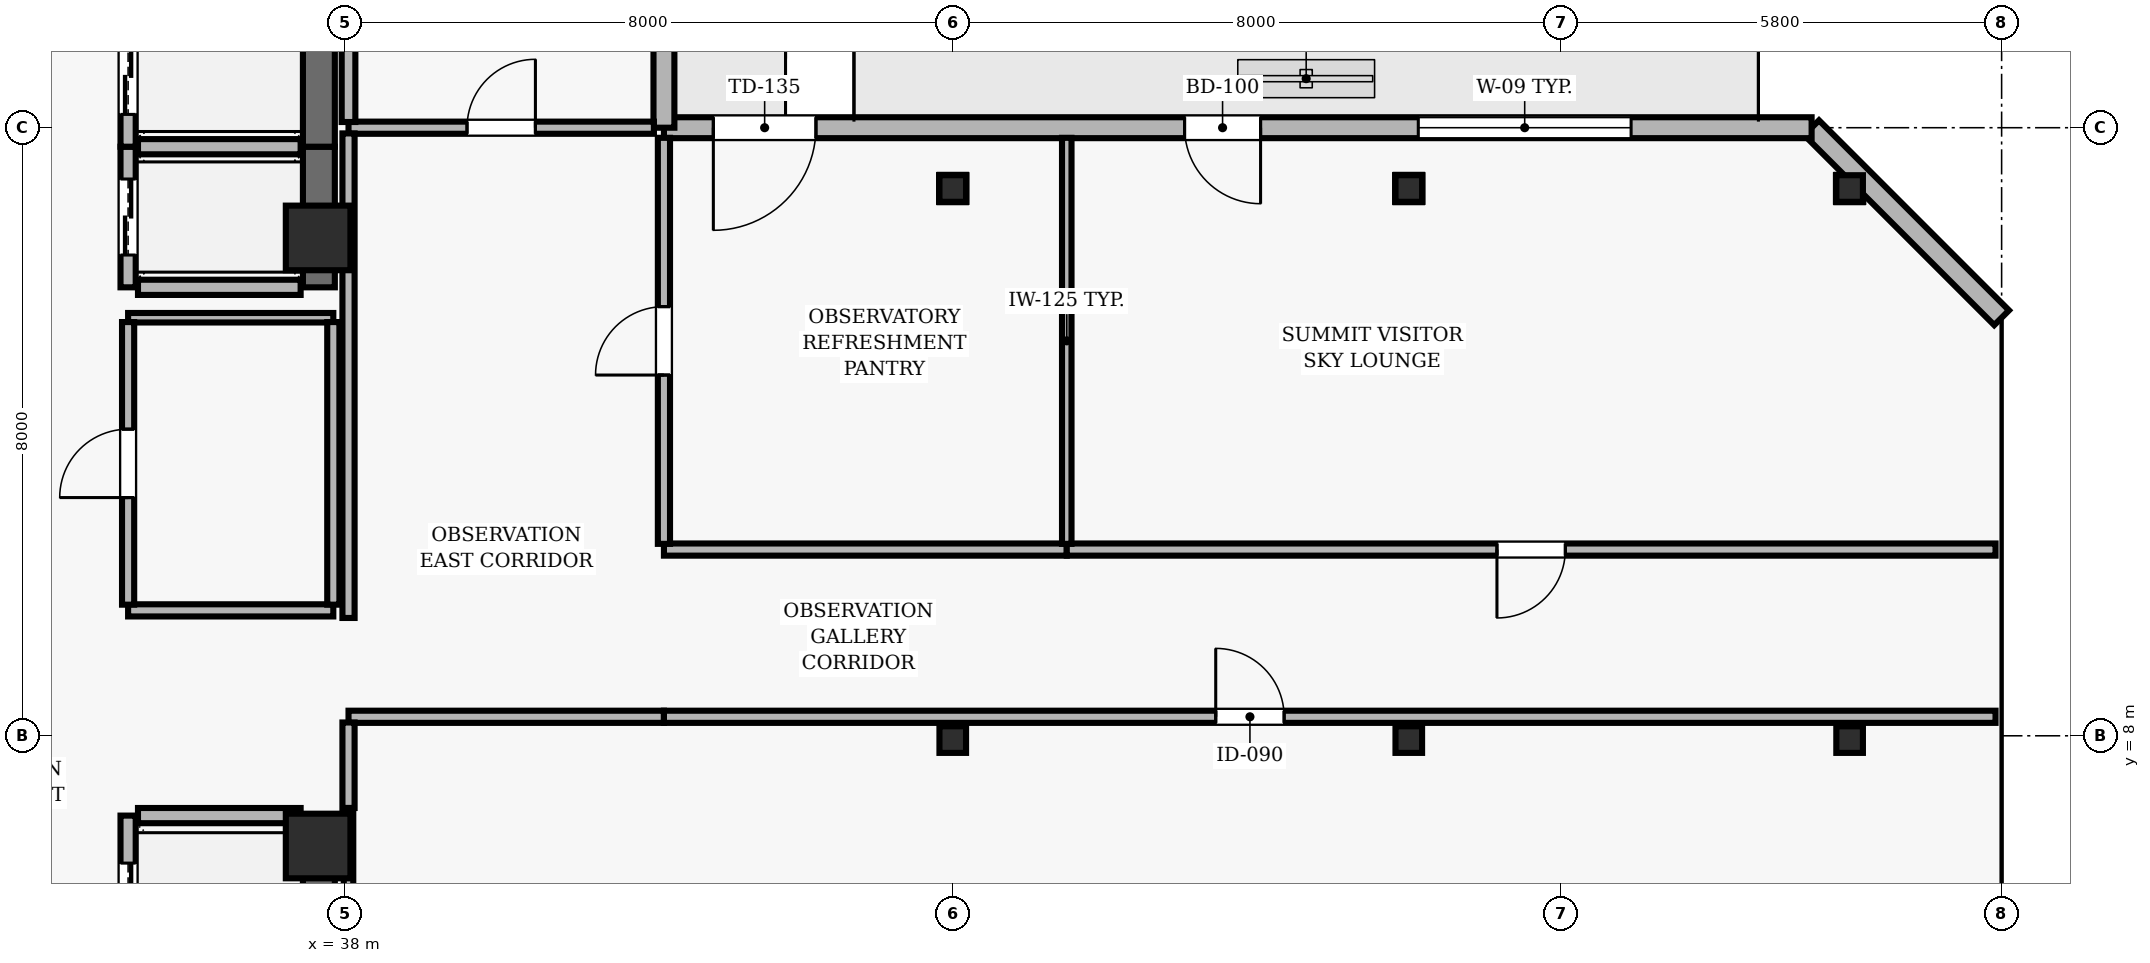
"""IFC4 building model, lengths in metres.
Left out: names, types, materials, properties, quantities, classifications, styles, units other than length and angle.
Written with IfcOpenShell. Run it as: python <this file> out.ifc"""

import sys

from ifc_helpers import new_model, si_unit, direction, frame, frame_2d, origin, origin_2d, place, context, subcontext, project, spatial, rectangle, hollow_rectangle, extrude, element, fill, save


model = new_model("IFC4")
c1 = context("Model", 3, precision=1e-05, world=origin(), true_north=direction((0.0, 1.0)))
c2 = subcontext(c1, "Body", "Model", "MODEL_VIEW")
j1 = project(units=[si_unit("LENGTHUNIT", "METRE"), si_unit("PLANEANGLEUNIT", "RADIAN")], contexts=[c1])
p1 = place(None, origin())
s1 = spatial("IfcSite", under=j1, at=p1, CompositionType="ELEMENT")
p2 = place(p1, origin())
s2 = spatial("IfcBuilding", under=s1, at=p2, CompositionType="ELEMENT")
p3 = place(p2, frame((0.0, 0.0, 311.7)))
s3 = spatial("IfcBuildingStorey", under=s2, at=p3, CompositionType="ELEMENT", Elevation=311.7)
for number, where, z_axis, x_axis in (
    (1, (37.65, 6.55, 0.0), (0.0, 0.0, 1.0), (1.0, 0.0, 0.0)),
    (2, (37.65, 14.55, 0.0), (0.0, 0.0, 1.0), (1.0, 0.0, 0.0)),
):
    element("IfcColumn", number, at=place(p3, frame(where, z_axis=z_axis, x_axis=x_axis)), inside=s3, PredefinedType="COLUMN", context=c2, shape_type="SweptSolid", body=[
        extrude(rectangle(XDim=0.85, YDim=0.85, at=origin_2d()), origin(), (0.0, 0.0, 1.0), 5.0),
    ])
for number, where, z_axis, x_axis in (
    (3, (46.0, 7.95, 0.0), (0.0, 0.0, 1.0), (1.0, 0.0, 0.0)),
    (4, (46.0, 15.2, 0.0), (0.0, 0.0, 1.0), (1.0, 0.0, 0.0)),
    (5, (52.0, 7.95, 0.0), (0.0, 0.0, 1.0), (1.0, 0.0, 0.0)),
    (6, (52.0, 15.2, 0.0), (0.0, 0.0, 1.0), (1.0, 0.0, 0.0)),
    (7, (57.8, 7.95, 0.0), (0.0, 0.0, 1.0), (1.0, 0.0, 0.0)),
    (8, (57.8, 15.2, 0.0), (0.0, 0.0, 1.0), (1.0, 0.0, 0.0)),
):
    element("IfcColumn", number, at=place(p3, frame(where, z_axis=z_axis, x_axis=x_axis)), inside=s3, PredefinedType="COLUMN", context=c2, shape_type="SweptSolid", body=[
        extrude(hollow_rectangle(XDim=0.35, YDim=0.35, WallThickness=0.016, at=origin_2d()), origin(), (0.0, 0.0, 1.0), 5.0),
    ])
p4 = place(p3, frame((59.8, 13.5, 0.0), z_axis=(0.0, 0.0, 1.0), x_axis=(-0.707106781187, 0.707106781187, 0.0)))
e9 = element("IfcWall", 9, at=p4, inside=s3, PredefinedType="SOLIDWALL", context=c2, shape_type="SweptSolid", body=[
    extrude(rectangle(XDim=3.536, YDim=0.275, at=frame_2d((1.768, 0.0))), origin(), (0.0, 0.0, 1.0), 4.74),
])
p5 = place(p3, frame((57.3, 16.0, 0.0), z_axis=(0.0, 0.0, 1.0), x_axis=(-1.0, 0.0, 0.0)))
e10 = element("IfcWall", 10, at=p5, inside=s3, PredefinedType="SOLIDWALL", context=c2, shape_type="SweptSolid", body=[
    extrude(rectangle(XDim=15.1, YDim=0.275, at=frame_2d((7.55, 0.0))), origin(), (0.0, 0.0, 1.0), 4.74),
])
p6 = place(p5, frame((7.25, 0.0, 0.0)))
e11 = element("IfcOpeningElement", 11, at=p6, cuts=e10, PredefinedType="OPENING", context=c2, shape_type="SweptSolid", body=[
    extrude(rectangle(XDim=1.0, YDim=2.2, at=frame_2d((0.5, 1.1))), frame((0.0, 0.147, 0.0), z_axis=(0.0, -1.0, 0.0), x_axis=(1.0, 0.0, 0.0)), (0.0, 0.0, 1.0), 0.295),
])
p7 = place(p5, frame((13.1, 0.0, 0.0)))
e12 = element("IfcOpeningElement", 12, at=p7, cuts=e10, PredefinedType="OPENING", context=c2, shape_type="SweptSolid", body=[
    extrude(rectangle(XDim=1.35, YDim=2.2, at=frame_2d((0.675, 1.1))), frame((0.0, 0.147, 0.0), z_axis=(0.0, -1.0, 0.0), x_axis=(1.0, 0.0, 0.0)), (0.0, 0.0, 1.0), 0.295),
])
p8 = place(p5, frame((2.375, 0.0, 0.9)))
e13 = element("IfcOpeningElement", 13, at=p8, cuts=e10, PredefinedType="OPENING", context=c2, shape_type="SweptSolid", body=[
    extrude(rectangle(XDim=2.8, YDim=1.8, at=frame_2d((1.4, 0.9))), frame((0.0, 0.147, 0.0), z_axis=(0.0, -1.0, 0.0), x_axis=(1.0, 0.0, 0.0)), (0.0, 0.0, 1.0), 0.295),
])
p9 = place(p3, frame((42.2, 16.0, 0.0), z_axis=(0.0, 0.0, 1.0), x_axis=(0.0, 1.0, 0.0)))
e14 = element("IfcWall", 14, at=p9, inside=s3, PredefinedType="SOLIDWALL", context=c2, shape_type="SweptSolid", body=[
    extrude(rectangle(XDim=3.45, YDim=0.275, at=frame_2d((1.725, 0.0))), origin(), (0.0, 0.0, 1.0), 4.74),
])
p10 = place(p3, frame((35.15, 6.95, 0.0), z_axis=(0.0, 0.0, 1.0), x_axis=(0.0, -1.0, 0.0)))
e15 = element("IfcWall", 15, at=p10, inside=s3, PredefinedType="SOLIDWALL", context=c2, shape_type="SweptSolid", body=[
    extrude(rectangle(XDim=2.25, YDim=0.2, at=frame_2d((1.125, 0.0))), origin(), (0.0, 0.0, 1.0), 4.74),
])
p11 = place(p10, frame((0.625, 0.0, 0.0)))
e16 = element("IfcOpeningElement", 16, at=p11, cuts=e15, PredefinedType="OPENING", context=c2, shape_type="SweptSolid", body=[
    extrude(rectangle(XDim=1.0, YDim=2.1, at=frame_2d((0.5, 1.05))), frame((0.0, 0.11, 0.0), z_axis=(0.0, -1.0, 0.0), x_axis=(1.0, 0.0, 0.0)), (0.0, 0.0, 1.0), 0.22),
])
p12 = place(p3, frame((37.66, 4.7, 0.0), z_axis=(0.0, 0.0, 1.0), x_axis=(0.0, 1.0, 0.0)))
e17 = element("IfcWall", 17, at=p12, inside=s3, PredefinedType="SHEAR", context=c2, shape_type="SweptSolid", body=[
    extrude(rectangle(XDim=2.25, YDim=0.42, at=frame_2d((1.125, 0.0))), origin(), (0.0, 0.0, 1.0), 4.74),
])
p13 = place(p3, frame((37.42, 6.95, 0.0), z_axis=(0.0, 0.0, 1.0), x_axis=(-1.0, 0.0, 0.0)))
e18 = element("IfcWall", 18, at=p13, inside=s3, PredefinedType="SOLIDWALL", context=c2, shape_type="SweptSolid", body=[
    extrude(rectangle(XDim=2.14, YDim=0.2, at=frame_2d((1.07, 0.0))), origin(), (0.0, 0.0, 1.0), 4.74),
])
p14 = place(p3, frame((35.15, 15.75, 0.0), z_axis=(0.0, 0.0, 1.0), x_axis=(0.0, -1.0, 0.0)))
e19 = element("IfcWall", 19, at=p14, inside=s3, PredefinedType="SOLIDWALL", context=c2, shape_type="SweptSolid", body=[
    extrude(rectangle(XDim=1.85, YDim=0.2, at=frame_2d((0.925, 0.0))), origin(), (0.0, 0.0, 1.0), 4.74),
])
p15 = place(p14, frame((0.425, 0.0, 0.0)))
e20 = element("IfcOpeningElement", 20, at=p15, cuts=e19, PredefinedType="OPENING", context=c2, shape_type="SweptSolid", body=[
    extrude(rectangle(XDim=1.0, YDim=2.1, at=frame_2d((0.5, 1.05))), frame((0.0, 0.11, 0.0), z_axis=(0.0, -1.0, 0.0), x_axis=(1.0, 0.0, 0.0)), (0.0, 0.0, 1.0), 0.22),
])
p16 = place(p3, frame((37.66, 13.9, 0.0), z_axis=(0.0, 0.0, 1.0), x_axis=(0.0, 1.0, 0.0)))
e21 = element("IfcWall", 21, at=p16, inside=s3, PredefinedType="SHEAR", context=c2, shape_type="SweptSolid", body=[
    extrude(rectangle(XDim=1.85, YDim=0.42, at=frame_2d((0.925, 0.0))), origin(), (0.0, 0.0, 1.0), 4.74),
])
for number, where, z_axis, x_axis in (
    (22, (35.28, 13.9, 0.0), (0.0, 0.0, 1.0), (1.0, 0.0, 0.0)),
    (23, (37.42, 15.75, 0.0), (0.0, 0.0, 1.0), (-1.0, 0.0, 0.0)),
):
    element("IfcWall", number, at=place(p3, frame(where, z_axis=z_axis, x_axis=x_axis)), inside=s3, PredefinedType="SOLIDWALL", context=c2, shape_type="SweptSolid", body=[
        extrude(rectangle(XDim=2.14, YDim=0.2, at=frame_2d((1.07, 0.0))), origin(), (0.0, 0.0, 1.0), 4.74),
    ])
p17 = place(p3, frame((35.15, 17.6, 0.0), z_axis=(0.0, 0.0, 1.0), x_axis=(0.0, -1.0, 0.0)))
e24 = element("IfcWall", 24, at=p17, inside=s3, PredefinedType="SOLIDWALL", context=c2, shape_type="SweptSolid", body=[
    extrude(rectangle(XDim=1.85, YDim=0.2, at=frame_2d((0.925, 0.0))), origin(), (0.0, 0.0, 1.0), 4.74),
])
p18 = place(p17, frame((0.425, 0.0, 0.0)))
e25 = element("IfcOpeningElement", 25, at=p18, cuts=e24, PredefinedType="OPENING", context=c2, shape_type="SweptSolid", body=[
    extrude(rectangle(XDim=1.0, YDim=2.1, at=frame_2d((0.5, 1.05))), frame((0.0, 0.11, 0.0), z_axis=(0.0, -1.0, 0.0), x_axis=(1.0, 0.0, 0.0)), (0.0, 0.0, 1.0), 0.22),
])
p19 = place(p3, frame((37.66, 15.75, 0.0), z_axis=(0.0, 0.0, 1.0), x_axis=(0.0, 1.0, 0.0)))
e26 = element("IfcWall", 26, at=p19, inside=s3, PredefinedType="SHEAR", context=c2, shape_type="SweptSolid", body=[
    extrude(rectangle(XDim=1.85, YDim=0.42, at=frame_2d((0.925, 0.0))), origin(), (0.0, 0.0, 1.0), 4.74),
])
p20 = place(p3, frame((35.15, 9.65, 0.0), z_axis=(0.0, 0.0, 1.0), x_axis=(1.0, 0.0, 0.0)))
e27 = element("IfcWall", 27, at=p20, inside=s3, PredefinedType="PARTITIONING", context=c2, shape_type="SweptSolid", body=[
    extrude(rectangle(XDim=2.7, YDim=0.16, at=frame_2d((1.35, 0.0))), origin(), (0.0, 0.0, 1.0), 4.74),
])
p21 = place(p3, frame((37.85, 13.5, 0.0), z_axis=(0.0, 0.0, 1.0), x_axis=(-1.0, 0.0, 0.0)))
e28 = element("IfcWall", 28, at=p21, inside=s3, PredefinedType="PARTITIONING", context=c2, shape_type="SweptSolid", body=[
    extrude(rectangle(XDim=2.7, YDim=0.125, at=frame_2d((1.35, 0.0))), origin(), (0.0, 0.0, 1.0), 4.74),
])
p22 = place(p3, frame((38.05, 8.25, 0.0), z_axis=(0.0, 0.0, 1.0), x_axis=(1.0, 0.0, 0.0)))
e29 = element("IfcWall", 29, at=p22, inside=s3, PredefinedType="PARTITIONING", context=c2, shape_type="SweptSolid", body=[
    extrude(rectangle(XDim=4.15, YDim=0.16, at=frame_2d((2.075, 0.0))), origin(), (0.0, 0.0, 1.0), 4.271),
])
p23 = place(p3, frame((38.05, 16.0, 0.0), z_axis=(0.0, 0.0, 1.0), x_axis=(1.0, 0.0, 0.0)))
e30 = element("IfcWall", 30, at=p23, inside=s3, PredefinedType="PARTITIONING", context=c2, shape_type="SweptSolid", body=[
    extrude(rectangle(XDim=4.018, YDim=0.16, at=frame_2d((2.009, 0.0))), origin(), (0.0, 0.0, 1.0), 4.74),
])
p24 = place(p23, frame((1.559, 0.0, 0.0)))
e31 = element("IfcOpeningElement", 31, at=p24, cuts=e30, PredefinedType="OPENING", context=c2, shape_type="SweptSolid", body=[
    extrude(rectangle(XDim=0.9, YDim=2.1, at=frame_2d((0.45, 1.05))), frame((0.0, 0.09, 0.0), z_axis=(0.0, -1.0, 0.0), x_axis=(1.0, 0.0, 0.0)), (0.0, 0.0, 1.0), 0.18),
])
p25 = place(p3, frame((42.2, 8.25, 0.0), z_axis=(0.0, 0.0, 1.0), x_axis=(1.0, 0.0, 0.0)))
e32 = element("IfcWall", 32, at=p25, inside=s3, PredefinedType="PARTITIONING", context=c2, shape_type="SweptSolid", body=[
    extrude(rectangle(XDim=17.52, YDim=0.16, at=frame_2d((8.76, 0.0))), origin(), (0.0, 0.0, 1.0), 4.271),
])
p26 = place(p25, frame((7.26, 0.0, 0.0)))
e33 = element("IfcOpeningElement", 33, at=p26, cuts=e32, PredefinedType="OPENING", context=c2, shape_type="SweptSolid", body=[
    extrude(rectangle(XDim=0.9, YDim=2.1, at=frame_2d((0.45, 1.05))), frame((0.0, 0.09, 0.0), z_axis=(0.0, -1.0, 0.0), x_axis=(1.0, 0.0, 0.0)), (0.0, 0.0, 1.0), 0.18),
])
p27 = place(p3, frame((47.5, 10.45, 0.0), z_axis=(0.0, 0.0, 1.0), x_axis=(-1.0, 0.0, 0.0)))
e34 = element("IfcWall", 34, at=p27, inside=s3, PredefinedType="PARTITIONING", context=c2, shape_type="SweptSolid", body=[
    extrude(rectangle(XDim=5.3, YDim=0.16, at=frame_2d((2.65, 0.0))), origin(), (0.0, 0.0, 1.0), 4.422),
])
p28 = place(p3, frame((59.72, 10.45, 0.0), z_axis=(0.0, 0.0, 1.0), x_axis=(-1.0, 0.0, 0.0)))
e35 = element("IfcWall", 35, at=p28, inside=s3, PredefinedType="PARTITIONING", context=c2, shape_type="SweptSolid", body=[
    extrude(rectangle(XDim=12.22, YDim=0.16, at=frame_2d((6.11, 0.0))), origin(), (0.0, 0.0, 1.0), 4.422),
])
p29 = place(p28, frame((5.66, 0.0, 0.0)))
e36 = element("IfcOpeningElement", 36, at=p29, cuts=e35, PredefinedType="OPENING", context=c2, shape_type="SweptSolid", body=[
    extrude(rectangle(XDim=0.9, YDim=2.1, at=frame_2d((0.45, 1.05))), frame((0.0, 0.09, 0.0), z_axis=(0.0, -1.0, 0.0), x_axis=(1.0, 0.0, 0.0)), (0.0, 0.0, 1.0), 0.18),
])
p30 = place(p3, frame((35.15, 9.725, 0.0), z_axis=(0.0, 0.0, 1.0), x_axis=(0.0, 1.0, 0.0)))
e37 = element("IfcWall", 37, at=p30, inside=s3, PredefinedType="PARTITIONING", context=c2, shape_type="SweptSolid", body=[
    extrude(rectangle(XDim=3.718, YDim=0.16, at=frame_2d((1.859, 0.0))), origin(), (0.0, 0.0, 1.0), 4.74),
])
p31 = place(p30, frame((1.409, 0.0, 0.0)))
e38 = element("IfcOpeningElement", 38, at=p31, cuts=e37, PredefinedType="OPENING", context=c2, shape_type="SweptSolid", body=[
    extrude(rectangle(XDim=0.9, YDim=2.1, at=frame_2d((0.45, 1.05))), frame((0.0, 0.09, 0.0), z_axis=(0.0, -1.0, 0.0), x_axis=(1.0, 0.0, 0.0)), (0.0, 0.0, 1.0), 0.18),
])
p32 = place(p3, frame((37.85, 9.725, 0.0), z_axis=(0.0, 0.0, 1.0), x_axis=(0.0, 1.0, 0.0)))
e39 = element("IfcWall", 39, at=p32, inside=s3, PredefinedType="PARTITIONING", context=c2, shape_type="SweptSolid", body=[
    extrude(rectangle(XDim=3.718, YDim=0.16, at=frame_2d((1.859, 0.0))), origin(), (0.0, 0.0, 1.0), 4.271),
])
p33 = place(p3, frame((38.05, 7.05, 0.0), z_axis=(0.0, 0.0, 1.0), x_axis=(0.0, 1.0, 0.0)))
e40 = element("IfcWall", 40, at=p33, inside=s3, PredefinedType="PARTITIONING", context=c2, shape_type="SweptSolid", body=[
    extrude(rectangle(XDim=1.125, YDim=0.16, at=frame_2d((0.562, 0.0))), origin(), (0.0, 0.0, 1.0), 4.271),
])
p34 = place(p3, frame((38.05, 7.05, 0.0), z_axis=(0.0, 0.0, 1.0), x_axis=(0.0, -1.0, 0.0)))
e41 = element("IfcWall", 41, at=p34, inside=s3, PredefinedType="PARTITIONING", context=c2, shape_type="SweptSolid", body=[
    extrude(rectangle(XDim=6.917, YDim=0.125, at=frame_2d((3.458, 0.0))), origin(), (0.0, 0.0, 1.0), 4.271),
])
p35 = place(p3, frame((38.05, 15.925, 0.0), z_axis=(0.0, 0.0, 1.0), x_axis=(0.0, -1.0, 0.0)))
e42 = element("IfcWall", 42, at=p35, inside=s3, PredefinedType="PARTITIONING", context=c2, shape_type="SweptSolid", body=[
    extrude(rectangle(XDim=6.375, YDim=0.16, at=frame_2d((3.188, 0.0))), origin(), (0.0, 0.0, 1.0), 4.271),
])
p36 = place(p3, frame((38.05, 20.367, 0.0), z_axis=(0.0, 0.0, 1.0), x_axis=(0.0, -1.0, 0.0)))
e43 = element("IfcWall", 43, at=p36, inside=s3, PredefinedType="PARTITIONING", context=c2, shape_type="SweptSolid", body=[
    extrude(rectangle(XDim=4.292, YDim=0.18, at=frame_2d((2.146, 0.0))), origin(), (0.0, 0.0, 1.0), 4.271),
])
p37 = place(p3, frame((42.2, 10.525, 0.0), z_axis=(0.0, 0.0, 1.0), x_axis=(0.0, 1.0, 0.0)))
e44 = element("IfcWall", 44, at=p37, inside=s3, PredefinedType="PARTITIONING", context=c2, shape_type="SweptSolid", body=[
    extrude(rectangle(XDim=5.342, YDim=0.16, at=frame_2d((2.671, 0.0))), origin(), (0.0, 0.0, 1.0), 4.74),
])
p38 = place(p37, frame((2.221, 0.0, 0.0)))
e45 = element("IfcOpeningElement", 45, at=p38, cuts=e44, PredefinedType="OPENING", context=c2, shape_type="SweptSolid", body=[
    extrude(rectangle(XDim=0.9, YDim=2.1, at=frame_2d((0.45, 1.05))), frame((0.0, 0.09, 0.0), z_axis=(0.0, -1.0, 0.0), x_axis=(1.0, 0.0, 0.0)), (0.0, 0.0, 1.0), 0.18),
])
p39 = place(p3, frame((47.5, 15.867, 0.0), z_axis=(0.0, 0.0, 1.0), x_axis=(0.0, -1.0, 0.0)))
e46 = element("IfcWall", 46, at=p39, inside=s3, PredefinedType="PARTITIONING", context=c2, shape_type="SweptSolid", body=[
    extrude(rectangle(XDim=5.342, YDim=0.125, at=frame_2d((2.671, 0.0))), origin(), (0.0, 0.0, 1.0), 4.74),
])
p40 = place(p6, origin())
e47 = element("IfcDoor", 47, at=p40, inside=s3, OperationType="SINGLE_SWING_LEFT", PredefinedType="DOOR", context=c2, shape_type="SweptSolid", body=[
    extrude(rectangle(XDim=1.0, YDim=2.2, at=frame_2d((0.5, 1.1))), frame((0.0, 0.025, 0.0), z_axis=(0.0, -1.0, 0.0), x_axis=(1.0, 0.0, 0.0)), (0.0, 0.0, 1.0), 0.05),
])
fill(e11, e47)
p41 = place(p7, origin())
e48 = element("IfcDoor", 48, at=p41, inside=s3, OperationType="SINGLE_SWING_RIGHT", PredefinedType="DOOR", context=c2, shape_type="SweptSolid", body=[
    extrude(rectangle(XDim=1.35, YDim=2.2, at=frame_2d((0.675, 1.1))), frame((0.0, 0.025, 0.0), z_axis=(0.0, -1.0, 0.0), x_axis=(1.0, 0.0, 0.0)), (0.0, 0.0, 1.0), 0.05),
])
fill(e12, e48)
p42 = place(p8, origin())
e49 = element("IfcWindow", 49, at=p42, inside=s3, PartitioningType="SINGLE_PANEL", PredefinedType="WINDOW", context=c2, shape_type="SweptSolid", body=[
    extrude(rectangle(XDim=2.8, YDim=1.8, at=frame_2d((1.4, 0.9))), frame((0.0, 0.03, 0.0), z_axis=(0.0, -1.0, 0.0), x_axis=(1.0, 0.0, 0.0)), (0.0, 0.0, 1.0), 0.06),
])
fill(e13, e49)
p43 = place(p11, origin())
e50 = element("IfcDoor", 50, at=p43, inside=s3, OperationType="DOUBLE_DOOR_SLIDING", PredefinedType="DOOR", context=c2, shape_type="SweptSolid", body=[
    extrude(rectangle(XDim=1.0, YDim=2.1, at=frame_2d((0.5, 1.05))), frame((0.0, 0.025, 0.0), z_axis=(0.0, -1.0, 0.0), x_axis=(1.0, 0.0, 0.0)), (0.0, 0.0, 1.0), 0.05),
])
fill(e16, e50)
p44 = place(p15, origin())
e51 = element("IfcDoor", 51, at=p44, inside=s3, OperationType="DOUBLE_DOOR_SLIDING", PredefinedType="DOOR", context=c2, shape_type="SweptSolid", body=[
    extrude(rectangle(XDim=1.0, YDim=2.1, at=frame_2d((0.5, 1.05))), frame((0.0, 0.025, 0.0), z_axis=(0.0, -1.0, 0.0), x_axis=(1.0, 0.0, 0.0)), (0.0, 0.0, 1.0), 0.05),
])
fill(e20, e51)
p45 = place(p18, origin())
e52 = element("IfcDoor", 52, at=p45, inside=s3, OperationType="DOUBLE_DOOR_SLIDING", PredefinedType="DOOR", context=c2, shape_type="SweptSolid", body=[
    extrude(rectangle(XDim=1.0, YDim=2.1, at=frame_2d((0.5, 1.05))), frame((0.0, 0.025, 0.0), z_axis=(0.0, -1.0, 0.0), x_axis=(1.0, 0.0, 0.0)), (0.0, 0.0, 1.0), 0.05),
])
fill(e25, e52)
p46 = place(p31, origin())
e53 = element("IfcDoor", 53, at=p46, inside=s3, OperationType="SINGLE_SWING_LEFT", PredefinedType="DOOR", context=c2, shape_type="SweptSolid", body=[
    extrude(rectangle(XDim=0.9, YDim=2.1, at=frame_2d((0.45, 1.05))), frame((0.0, 0.025, 0.0), z_axis=(0.0, -1.0, 0.0), x_axis=(1.0, 0.0, 0.0)), (0.0, 0.0, 1.0), 0.05),
])
fill(e38, e53)
p47 = place(p26, origin())
e54 = element("IfcDoor", 54, at=p47, inside=s3, OperationType="SINGLE_SWING_LEFT", PredefinedType="DOOR", context=c2, shape_type="SweptSolid", body=[
    extrude(rectangle(XDim=0.9, YDim=2.1, at=frame_2d((0.45, 1.05))), frame((0.0, 0.025, 0.0), z_axis=(0.0, -1.0, 0.0), x_axis=(1.0, 0.0, 0.0)), (0.0, 0.0, 1.0), 0.05),
])
fill(e33, e54)
p48 = place(p29, origin())
e55 = element("IfcDoor", 55, at=p48, inside=s3, OperationType="SINGLE_SWING_RIGHT", PredefinedType="DOOR", context=c2, shape_type="SweptSolid", body=[
    extrude(rectangle(XDim=0.9, YDim=2.1, at=frame_2d((0.45, 1.05))), frame((0.0, 0.025, 0.0), z_axis=(0.0, -1.0, 0.0), x_axis=(1.0, 0.0, 0.0)), (0.0, 0.0, 1.0), 0.05),
])
fill(e36, e55)
p49 = place(p38, origin())
e56 = element("IfcDoor", 56, at=p49, inside=s3, OperationType="SINGLE_SWING_LEFT", PredefinedType="DOOR", context=c2, shape_type="SweptSolid", body=[
    extrude(rectangle(XDim=0.9, YDim=2.1, at=frame_2d((0.45, 1.05))), frame((0.0, 0.025, 0.0), z_axis=(0.0, -1.0, 0.0), x_axis=(1.0, 0.0, 0.0)), (0.0, 0.0, 1.0), 0.05),
])
fill(e45, e56)
p50 = place(p24, origin())
e57 = element("IfcDoor", 57, at=p50, inside=s3, OperationType="SINGLE_SWING_RIGHT", PredefinedType="DOOR", context=c2, shape_type="SweptSolid", body=[
    extrude(rectangle(XDim=0.9, YDim=2.1, at=frame_2d((0.45, 1.05))), frame((0.0, 0.025, 0.0), z_axis=(0.0, -1.0, 0.0), x_axis=(1.0, 0.0, 0.0)), (0.0, 0.0, 1.0), 0.05),
])
fill(e31, e57)
save(model, sys.argv[1])
